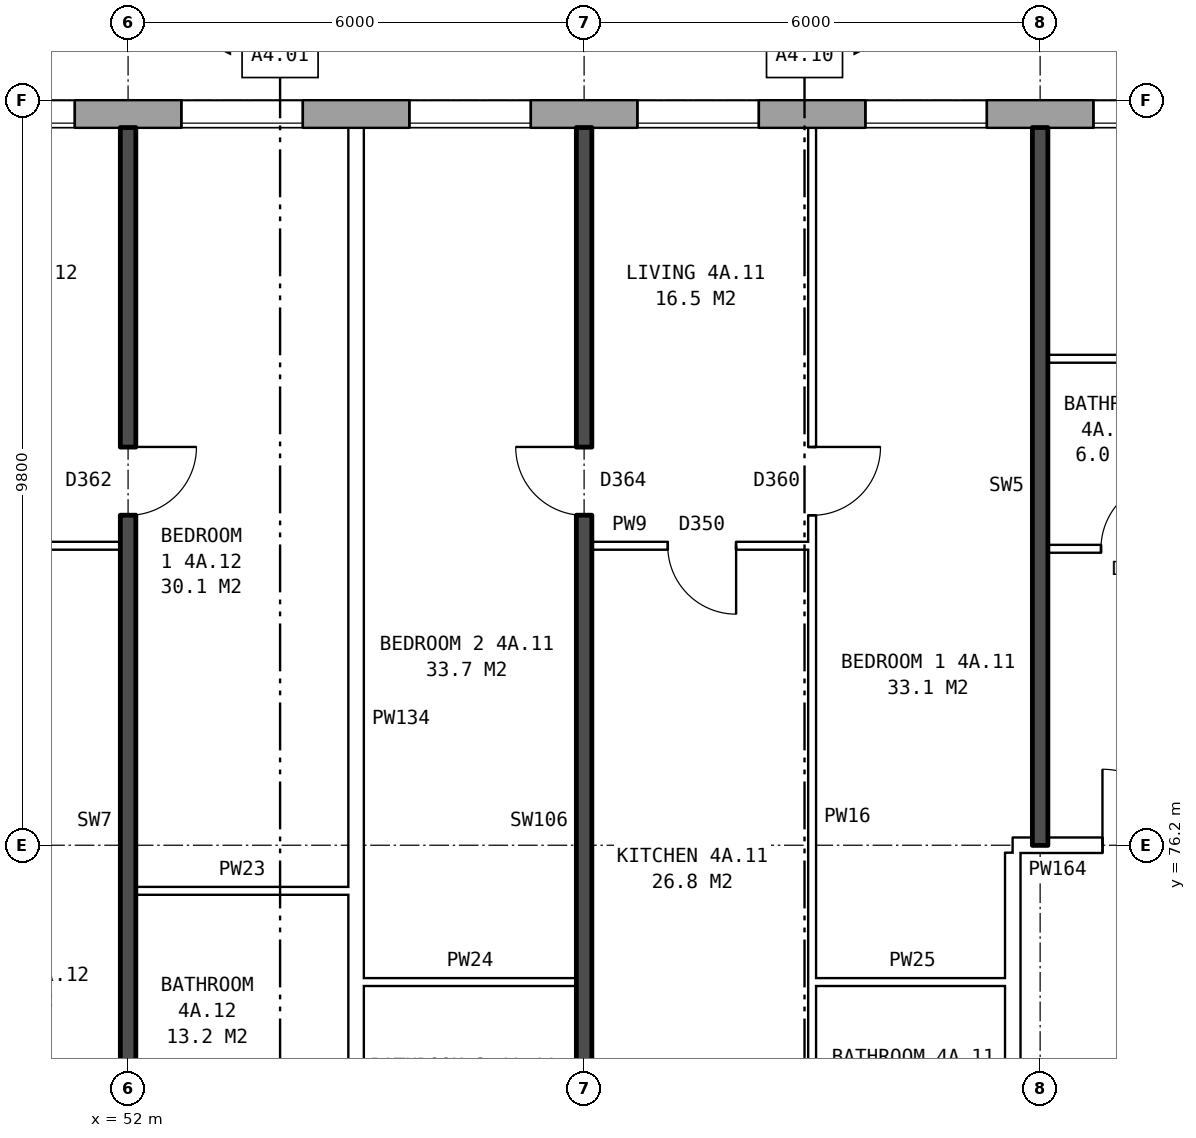
"""IFC4 building model, lengths in metres.
Left out: names, types, materials, properties, quantities, classifications, styles, units other than length and angle.
Written with IfcOpenShell. Run it as: python <this file> out.ifc"""

import sys

from ifc_helpers import new_model, si_unit, direction, frame, frame_2d, origin, place, context, subcontext, project, spatial, rectangle, extrude, element, fill, save


model = new_model("IFC4")
c1 = context("Model", 3, precision=1e-05, world=origin(), true_north=direction((0.0, 1.0)))
c2 = subcontext(c1, "Body", "Model", "MODEL_VIEW")
j1 = project(units=[si_unit("LENGTHUNIT", "METRE"), si_unit("PLANEANGLEUNIT", "RADIAN")], contexts=[c1])
p1 = place(None, origin())
s1 = spatial("IfcSite", under=j1, at=p1, CompositionType="ELEMENT")
p2 = place(p1, origin())
s2 = spatial("IfcBuilding", under=s1, at=p2, CompositionType="ELEMENT")
p3 = place(p2, frame((0.0, 0.0, 19.5)))
s3 = spatial("IfcBuildingStorey", under=s2, at=p3, CompositionType="ELEMENT", Elevation=19.5)
p4 = place(p3, frame((72.925, 85.82, 0.0), z_axis=(0.0, 0.0, 1.0), x_axis=(-1.0, 0.0, 0.0)))
e1 = element("IfcWall", 1, at=p4, inside=s3, PredefinedType="STANDARD", context=c2, shape_type="SweptSolid", body=[
    extrude(rectangle(XDim=50.101, YDim=0.36, at=frame_2d((25.05, 0.0))), origin(), (0.0, 0.0, 1.0), 2.85),
])
p5 = place(p4, frame((0.75, 0.0, 0.8)))
e2 = element("IfcOpeningElement", 2, at=p5, cuts=e1, PredefinedType="OPENING", context=c2, shape_type="SweptSolid", body=[
    extrude(rectangle(XDim=0.6, YDim=0.9, at=frame_2d((0.3, 0.45))), frame((0.0, 0.19, 0.0), z_axis=(0.0, -1.0, 0.0), x_axis=(1.0, 0.0, 0.0)), (0.0, 0.0, 1.0), 0.38),
])
p6 = place(p4, frame((3.625, 0.0, 0.8)))
e3 = element("IfcOpeningElement", 3, at=p6, cuts=e1, PredefinedType="OPENING", context=c2, shape_type="SweptSolid", body=[
    extrude(rectangle(XDim=1.6, YDim=1.8, at=frame_2d((0.8, 0.9))), frame((0.0, 0.19, 0.0), z_axis=(0.0, -1.0, 0.0), x_axis=(1.0, 0.0, 0.0)), (0.0, 0.0, 1.0), 0.38),
])
p7 = place(p4, frame((6.625, 0.0, 0.8)))
e4 = element("IfcOpeningElement", 4, at=p7, cuts=e1, PredefinedType="OPENING", context=c2, shape_type="SweptSolid", body=[
    extrude(rectangle(XDim=1.6, YDim=1.8, at=frame_2d((0.8, 0.9))), frame((0.0, 0.19, 0.0), z_axis=(0.0, -1.0, 0.0), x_axis=(1.0, 0.0, 0.0)), (0.0, 0.0, 1.0), 0.38),
])
p8 = place(p4, frame((9.625, 0.0, 0.8)))
e5 = element("IfcOpeningElement", 5, at=p8, cuts=e1, PredefinedType="OPENING", context=c2, shape_type="SweptSolid", body=[
    extrude(rectangle(XDim=1.6, YDim=1.8, at=frame_2d((0.8, 0.9))), frame((0.0, 0.19, 0.0), z_axis=(0.0, -1.0, 0.0), x_axis=(1.0, 0.0, 0.0)), (0.0, 0.0, 1.0), 0.38),
])
p9 = place(p4, frame((12.625, 0.0, 0.8)))
e6 = element("IfcOpeningElement", 6, at=p9, cuts=e1, PredefinedType="OPENING", context=c2, shape_type="SweptSolid", body=[
    extrude(rectangle(XDim=1.6, YDim=1.8, at=frame_2d((0.8, 0.9))), frame((0.0, 0.19, 0.0), z_axis=(0.0, -1.0, 0.0), x_axis=(1.0, 0.0, 0.0)), (0.0, 0.0, 1.0), 0.38),
])
p10 = place(p4, frame((15.625, 0.0, 0.8)))
e7 = element("IfcOpeningElement", 7, at=p10, cuts=e1, PredefinedType="OPENING", context=c2, shape_type="SweptSolid", body=[
    extrude(rectangle(XDim=1.6, YDim=1.8, at=frame_2d((0.8, 0.9))), frame((0.0, 0.19, 0.0), z_axis=(0.0, -1.0, 0.0), x_axis=(1.0, 0.0, 0.0)), (0.0, 0.0, 1.0), 0.38),
])
p11 = place(p4, frame((18.625, 0.0, 0.8)))
e8 = element("IfcOpeningElement", 8, at=p11, cuts=e1, PredefinedType="OPENING", context=c2, shape_type="SweptSolid", body=[
    extrude(rectangle(XDim=1.6, YDim=1.8, at=frame_2d((0.8, 0.9))), frame((0.0, 0.19, 0.0), z_axis=(0.0, -1.0, 0.0), x_axis=(1.0, 0.0, 0.0)), (0.0, 0.0, 1.0), 0.38),
])
p12 = place(p4, frame((21.625, 0.0, 0.8)))
e9 = element("IfcOpeningElement", 9, at=p12, cuts=e1, PredefinedType="OPENING", context=c2, shape_type="SweptSolid", body=[
    extrude(rectangle(XDim=1.6, YDim=1.8, at=frame_2d((0.8, 0.9))), frame((0.0, 0.19, 0.0), z_axis=(0.0, -1.0, 0.0), x_axis=(1.0, 0.0, 0.0)), (0.0, 0.0, 1.0), 0.38),
])
p13 = place(p4, frame((24.625, 0.0, 0.8)))
e10 = element("IfcOpeningElement", 10, at=p13, cuts=e1, PredefinedType="OPENING", context=c2, shape_type="SweptSolid", body=[
    extrude(rectangle(XDim=1.6, YDim=1.8, at=frame_2d((0.8, 0.9))), frame((0.0, 0.19, 0.0), z_axis=(0.0, -1.0, 0.0), x_axis=(1.0, 0.0, 0.0)), (0.0, 0.0, 1.0), 0.38),
])
p14 = place(p4, frame((27.625, 0.0, 0.8)))
e11 = element("IfcOpeningElement", 11, at=p14, cuts=e1, PredefinedType="OPENING", context=c2, shape_type="SweptSolid", body=[
    extrude(rectangle(XDim=1.6, YDim=1.8, at=frame_2d((0.8, 0.9))), frame((0.0, 0.19, 0.0), z_axis=(0.0, -1.0, 0.0), x_axis=(1.0, 0.0, 0.0)), (0.0, 0.0, 1.0), 0.38),
])
p15 = place(p4, frame((30.625, 0.0, 0.8)))
e12 = element("IfcOpeningElement", 12, at=p15, cuts=e1, PredefinedType="OPENING", context=c2, shape_type="SweptSolid", body=[
    extrude(rectangle(XDim=1.6, YDim=1.8, at=frame_2d((0.8, 0.9))), frame((0.0, 0.19, 0.0), z_axis=(0.0, -1.0, 0.0), x_axis=(1.0, 0.0, 0.0)), (0.0, 0.0, 1.0), 0.38),
])
p16 = place(p4, frame((33.625, 0.0, 0.8)))
e13 = element("IfcOpeningElement", 13, at=p16, cuts=e1, PredefinedType="OPENING", context=c2, shape_type="SweptSolid", body=[
    extrude(rectangle(XDim=1.6, YDim=1.8, at=frame_2d((0.8, 0.9))), frame((0.0, 0.19, 0.0), z_axis=(0.0, -1.0, 0.0), x_axis=(1.0, 0.0, 0.0)), (0.0, 0.0, 1.0), 0.38),
])
p17 = place(p4, frame((36.625, 0.0, 0.8)))
e14 = element("IfcOpeningElement", 14, at=p17, cuts=e1, PredefinedType="OPENING", context=c2, shape_type="SweptSolid", body=[
    extrude(rectangle(XDim=1.6, YDim=1.8, at=frame_2d((0.8, 0.9))), frame((0.0, 0.19, 0.0), z_axis=(0.0, -1.0, 0.0), x_axis=(1.0, 0.0, 0.0)), (0.0, 0.0, 1.0), 0.38),
])
p18 = place(p4, frame((39.625, 0.0, 0.8)))
e15 = element("IfcOpeningElement", 15, at=p18, cuts=e1, PredefinedType="OPENING", context=c2, shape_type="SweptSolid", body=[
    extrude(rectangle(XDim=1.6, YDim=1.8, at=frame_2d((0.8, 0.9))), frame((0.0, 0.19, 0.0), z_axis=(0.0, -1.0, 0.0), x_axis=(1.0, 0.0, 0.0)), (0.0, 0.0, 1.0), 0.38),
])
p19 = place(p4, frame((42.625, 0.0, 0.8)))
e16 = element("IfcOpeningElement", 16, at=p19, cuts=e1, PredefinedType="OPENING", context=c2, shape_type="SweptSolid", body=[
    extrude(rectangle(XDim=1.6, YDim=1.8, at=frame_2d((0.8, 0.9))), frame((0.0, 0.19, 0.0), z_axis=(0.0, -1.0, 0.0), x_axis=(1.0, 0.0, 0.0)), (0.0, 0.0, 1.0), 0.38),
])
p20 = place(p4, frame((45.625, 0.0, 0.8)))
e17 = element("IfcOpeningElement", 17, at=p20, cuts=e1, PredefinedType="OPENING", context=c2, shape_type="SweptSolid", body=[
    extrude(rectangle(XDim=1.6, YDim=1.8, at=frame_2d((0.8, 0.9))), frame((0.0, 0.19, 0.0), z_axis=(0.0, -1.0, 0.0), x_axis=(1.0, 0.0, 0.0)), (0.0, 0.0, 1.0), 0.38),
])
p21 = place(p4, frame((1.65, 0.0, 0.8)))
e18 = element("IfcOpeningElement", 18, at=p21, cuts=e1, PredefinedType="OPENING", context=c2, shape_type="SweptSolid", body=[
    extrude(rectangle(XDim=1.0, YDim=1.5, at=frame_2d((0.5, 0.75))), frame((0.0, 0.19, 0.0), z_axis=(0.0, -1.0, 0.0), x_axis=(1.0, 0.0, 0.0)), (0.0, 0.0, 1.0), 0.38),
])
p22 = place(p3, frame((63.64, 63.9, 0.0), z_axis=(0.0, 0.0, 1.0), x_axis=(0.0, 1.0, 0.0)))
e19 = element("IfcWall", 19, at=p22, inside=s3, PredefinedType="PARTITIONING", context=c2, shape_type="SweptSolid", body=[
    extrude(rectangle(XDim=12.2, YDim=0.2, at=frame_2d((6.1, 0.0))), origin(), (0.0, 0.0, 1.0), 2.85),
])
p23 = place(p22, frame((5.1, 0.0, 0.0)))
e20 = element("IfcOpeningElement", 20, at=p23, cuts=e19, PredefinedType="OPENING", context=c2, shape_type="SweptSolid", body=[
    extrude(rectangle(XDim=2.0, YDim=2.1, at=frame_2d((1.0, 1.05))), frame((0.0, 0.11, 0.0), z_axis=(0.0, -1.0, 0.0), x_axis=(1.0, 0.0, 0.0)), (0.0, 0.0, 1.0), 0.22),
])
p24 = place(p3, frame((55.1, 74.4, 0.0), z_axis=(0.0, 0.0, 1.0), x_axis=(1.0, 0.0, 0.0)))
e21 = element("IfcWall", 21, at=p24, inside=s3, PredefinedType="PARTITIONING", context=c2, shape_type="SweptSolid", body=[
    extrude(rectangle(XDim=2.8, YDim=0.1, at=frame_2d((1.4, 0.0))), origin(), (0.0, 0.0, 1.0), 2.85),
])
p25 = place(p3, frame((61.0, 74.4, 0.0), z_axis=(0.0, 0.0, 1.0), x_axis=(1.0, 0.0, 0.0)))
e22 = element("IfcWall", 22, at=p25, inside=s3, PredefinedType="PARTITIONING", context=c2, shape_type="SweptSolid", body=[
    extrude(rectangle(XDim=2.64, YDim=0.1, at=frame_2d((1.32, 0.0))), origin(), (0.0, 0.0, 1.0), 2.85),
])
p26 = place(p3, frame((52.1, 75.6, 0.0), z_axis=(0.0, 0.0, 1.0), x_axis=(1.0, 0.0, 0.0)))
e23 = element("IfcWall", 23, at=p26, inside=s3, PredefinedType="PARTITIONING", context=c2, shape_type="SweptSolid", body=[
    extrude(rectangle(XDim=2.8, YDim=0.1, at=frame_2d((1.4, 0.0))), origin(), (0.0, 0.0, 1.0), 2.85),
])
p27 = place(p3, frame((63.64, 76.2, 0.0), z_axis=(0.0, 0.0, 1.0), x_axis=(1.0, 0.0, 0.0)))
e24 = element("IfcWall", 24, at=p27, inside=s3, PredefinedType="PARTITIONING", context=c2, shape_type="SweptSolid", body=[
    extrude(rectangle(XDim=3.0, YDim=0.2, at=frame_2d((1.5, 0.0))), origin(), (0.0, 0.0, 1.0), 2.85),
])
p28 = place(p27, frame((1.18, 0.0, 0.0)))
e25 = element("IfcOpeningElement", 25, at=p28, cuts=e24, PredefinedType="OPENING", context=c2, shape_type="SweptSolid", body=[
    extrude(rectangle(XDim=1.0, YDim=2.1, at=frame_2d((0.5, 1.05))), frame((0.0, 0.11, 0.0), z_axis=(0.0, -1.0, 0.0), x_axis=(1.0, 0.0, 0.0)), (0.0, 0.0, 1.0), 0.22),
])
p29 = place(p3, frame((64.1, 80.1, 0.0), z_axis=(0.0, 0.0, 1.0), x_axis=(1.0, 0.0, 0.0)))
e26 = element("IfcWall", 26, at=p29, inside=s3, PredefinedType="PARTITIONING", context=c2, shape_type="SweptSolid", body=[
    extrude(rectangle(XDim=5.8, YDim=0.1, at=frame_2d((2.9, 0.0))), origin(), (0.0, 0.0, 1.0), 2.85),
])
p30 = place(p29, frame((3.6, 0.0, 0.0)))
e27 = element("IfcOpeningElement", 27, at=p30, cuts=e26, PredefinedType="OPENING", context=c2, shape_type="SweptSolid", body=[
    extrude(rectangle(XDim=0.9, YDim=2.1, at=frame_2d((0.45, 1.05))), frame((0.0, 0.06, 0.0), z_axis=(0.0, -1.0, 0.0), x_axis=(1.0, 0.0, 0.0)), (0.0, 0.0, 1.0), 0.12),
])
p31 = place(p29, frame((0.7, 0.0, 0.0)))
e28 = element("IfcOpeningElement", 28, at=p31, cuts=e26, PredefinedType="OPENING", context=c2, shape_type="SweptSolid", body=[
    extrude(rectangle(XDim=0.9, YDim=2.1, at=frame_2d((0.45, 1.05))), frame((0.0, 0.06, 0.0), z_axis=(0.0, -1.0, 0.0), x_axis=(1.0, 0.0, 0.0)), (0.0, 0.0, 1.0), 0.12),
])
p32 = place(p3, frame((49.0, 80.14, 0.0), z_axis=(0.0, 0.0, 1.0), x_axis=(1.0, 0.0, 0.0)))
e29 = element("IfcWall", 29, at=p32, inside=s3, PredefinedType="PARTITIONING", context=c2, shape_type="SweptSolid", body=[
    extrude(rectangle(XDim=2.9, YDim=0.1, at=frame_2d((1.45, 0.0))), origin(), (0.0, 0.0, 1.0), 2.85),
])
p33 = place(p32, frame((1.0, 0.0, 0.0)))
e30 = element("IfcOpeningElement", 30, at=p33, cuts=e29, PredefinedType="OPENING", context=c2, shape_type="SweptSolid", body=[
    extrude(rectangle(XDim=0.9, YDim=2.1, at=frame_2d((0.45, 1.05))), frame((0.0, 0.06, 0.0), z_axis=(0.0, -1.0, 0.0), x_axis=(1.0, 0.0, 0.0)), (0.0, 0.0, 1.0), 0.12),
])
p34 = place(p3, frame((58.1, 80.14, 0.0), z_axis=(0.0, 0.0, 1.0), x_axis=(1.0, 0.0, 0.0)))
e31 = element("IfcWall", 31, at=p34, inside=s3, PredefinedType="PARTITIONING", context=c2, shape_type="SweptSolid", body=[
    extrude(rectangle(XDim=2.9, YDim=0.1, at=frame_2d((1.45, 0.0))), origin(), (0.0, 0.0, 1.0), 2.85),
])
p35 = place(p34, frame((1.0, 0.0, 0.0)))
e32 = element("IfcOpeningElement", 32, at=p35, cuts=e31, PredefinedType="OPENING", context=c2, shape_type="SweptSolid", body=[
    extrude(rectangle(XDim=0.9, YDim=2.1, at=frame_2d((0.45, 1.05))), frame((0.0, 0.06, 0.0), z_axis=(0.0, -1.0, 0.0), x_axis=(1.0, 0.0, 0.0)), (0.0, 0.0, 1.0), 0.12),
])
p36 = place(p3, frame((64.1, 82.6, 0.0), z_axis=(0.0, 0.0, 1.0), x_axis=(1.0, 0.0, 0.0)))
e33 = element("IfcWall", 33, at=p36, inside=s3, PredefinedType="PARTITIONING", context=c2, shape_type="SweptSolid", body=[
    extrude(rectangle(XDim=2.3, YDim=0.1, at=frame_2d((1.15, 0.0))), origin(), (0.0, 0.0, 1.0), 2.85),
])
p37 = place(p3, frame((52.0, 71.2, 0.0), z_axis=(0.0, 0.0, 1.0), x_axis=(0.0, 1.0, 0.0)))
e34 = element("IfcWall", 34, at=p37, inside=s3, PredefinedType="SOLIDWALL", context=c2, shape_type="SweptSolid", body=[
    extrude(rectangle(XDim=14.44, YDim=0.2, at=frame_2d((7.22, 0.0))), origin(), (0.0, 0.0, 1.0), 2.85),
])
p38 = place(p37, frame((9.34, 0.0, 0.0)))
e35 = element("IfcOpeningElement", 35, at=p38, cuts=e34, PredefinedType="OPENING", context=c2, shape_type="SweptSolid", body=[
    extrude(rectangle(XDim=0.9, YDim=2.1, at=frame_2d((0.45, 1.05))), frame((0.0, 0.11, 0.0), z_axis=(0.0, -1.0, 0.0), x_axis=(1.0, 0.0, 0.0)), (0.0, 0.0, 1.0), 0.22),
])
p39 = place(p37, frame((0.4, 0.0, 0.0)))
e36 = element("IfcOpeningElement", 36, at=p39, cuts=e34, PredefinedType="OPENING", context=c2, shape_type="SweptSolid", body=[
    extrude(rectangle(XDim=0.9, YDim=2.1, at=frame_2d((0.45, 1.05))), frame((0.0, 0.11, 0.0), z_axis=(0.0, -1.0, 0.0), x_axis=(1.0, 0.0, 0.0)), (0.0, 0.0, 1.0), 0.22),
])
p40 = place(p3, frame((55.0, 71.3, 0.0), z_axis=(0.0, 0.0, 1.0), x_axis=(0.0, 1.0, 0.0)))
e37 = element("IfcWall", 37, at=p40, inside=s3, PredefinedType="PARTITIONING", context=c2, shape_type="SweptSolid", body=[
    extrude(rectangle(XDim=14.34, YDim=0.2, at=frame_2d((7.17, 0.0))), origin(), (0.0, 0.0, 1.0), 2.85),
])
p41 = place(p3, frame((58.0, 71.2, 0.0), z_axis=(0.0, 0.0, 1.0), x_axis=(0.0, 1.0, 0.0)))
e38 = element("IfcWall", 38, at=p41, inside=s3, PredefinedType="SOLIDWALL", context=c2, shape_type="SweptSolid", body=[
    extrude(rectangle(XDim=14.44, YDim=0.2, at=frame_2d((7.22, 0.0))), origin(), (0.0, 0.0, 1.0), 2.85),
])
p42 = place(p41, frame((9.34, 0.0, 0.0)))
e39 = element("IfcOpeningElement", 39, at=p42, cuts=e38, PredefinedType="OPENING", context=c2, shape_type="SweptSolid", body=[
    extrude(rectangle(XDim=0.9, YDim=2.1, at=frame_2d((0.45, 1.05))), frame((0.0, 0.11, 0.0), z_axis=(0.0, -1.0, 0.0), x_axis=(1.0, 0.0, 0.0)), (0.0, 0.0, 1.0), 0.22),
])
p43 = place(p41, frame((0.4, 0.0, 0.0)))
e40 = element("IfcOpeningElement", 40, at=p43, cuts=e38, PredefinedType="OPENING", context=c2, shape_type="SweptSolid", body=[
    extrude(rectangle(XDim=0.9, YDim=2.1, at=frame_2d((0.45, 1.05))), frame((0.0, 0.11, 0.0), z_axis=(0.0, -1.0, 0.0), x_axis=(1.0, 0.0, 0.0)), (0.0, 0.0, 1.0), 0.22),
])
p44 = place(p3, frame((61.0, 71.3, 0.0), z_axis=(0.0, 0.0, 1.0), x_axis=(0.0, 1.0, 0.0)))
e41 = element("IfcWall", 41, at=p44, inside=s3, PredefinedType="PARTITIONING", context=c2, shape_type="SweptSolid", body=[
    extrude(rectangle(XDim=14.34, YDim=0.1, at=frame_2d((7.17, 0.0))), origin(), (0.0, 0.0, 1.0), 2.85),
])
p45 = place(p44, frame((9.24, 0.0, 0.0)))
e42 = element("IfcOpeningElement", 42, at=p45, cuts=e41, PredefinedType="OPENING", context=c2, shape_type="SweptSolid", body=[
    extrude(rectangle(XDim=0.9, YDim=2.1, at=frame_2d((0.45, 1.05))), frame((0.0, 0.06, 0.0), z_axis=(0.0, -1.0, 0.0), x_axis=(1.0, 0.0, 0.0)), (0.0, 0.0, 1.0), 0.12),
])
p46 = place(p44, frame((0.4, 0.0, 0.0)))
e43 = element("IfcOpeningElement", 43, at=p46, cuts=e41, PredefinedType="OPENING", context=c2, shape_type="SweptSolid", body=[
    extrude(rectangle(XDim=0.9, YDim=2.1, at=frame_2d((0.45, 1.05))), frame((0.0, 0.06, 0.0), z_axis=(0.0, -1.0, 0.0), x_axis=(1.0, 0.0, 0.0)), (0.0, 0.0, 1.0), 0.12),
])
p47 = place(p3, frame((64.0, 76.2, 0.0), z_axis=(0.0, 0.0, 1.0), x_axis=(0.0, 1.0, 0.0)))
e44 = element("IfcWall", 44, at=p47, inside=s3, PredefinedType="SOLIDWALL", context=c2, shape_type="SweptSolid", body=[
    extrude(rectangle(XDim=9.44, YDim=0.2, at=frame_2d((4.72, 0.0))), origin(), (0.0, 0.0, 1.0), 2.85),
])
p48 = place(p7, origin())
e45 = element("IfcWindow", 45, at=p48, inside=s3, PartitioningType="SINGLE_PANEL", PredefinedType="WINDOW", context=c2, shape_type="SweptSolid", body=[
    extrude(rectangle(XDim=1.6, YDim=1.8, at=frame_2d((0.8, 0.9))), frame((0.0, 0.15, 0.0), z_axis=(0.0, -1.0, 0.0), x_axis=(1.0, 0.0, 0.0)), (0.0, 0.0, 1.0), 0.06),
])
fill(e4, e45)
p49 = place(p8, origin())
e46 = element("IfcWindow", 46, at=p49, inside=s3, PartitioningType="SINGLE_PANEL", PredefinedType="WINDOW", context=c2, shape_type="SweptSolid", body=[
    extrude(rectangle(XDim=1.6, YDim=1.8, at=frame_2d((0.8, 0.9))), frame((0.0, 0.15, 0.0), z_axis=(0.0, -1.0, 0.0), x_axis=(1.0, 0.0, 0.0)), (0.0, 0.0, 1.0), 0.06),
])
fill(e5, e46)
p50 = place(p9, origin())
e47 = element("IfcWindow", 47, at=p50, inside=s3, PartitioningType="SINGLE_PANEL", PredefinedType="WINDOW", context=c2, shape_type="SweptSolid", body=[
    extrude(rectangle(XDim=1.6, YDim=1.8, at=frame_2d((0.8, 0.9))), frame((0.0, 0.15, 0.0), z_axis=(0.0, -1.0, 0.0), x_axis=(1.0, 0.0, 0.0)), (0.0, 0.0, 1.0), 0.06),
])
fill(e6, e47)
p51 = place(p10, origin())
e48 = element("IfcWindow", 48, at=p51, inside=s3, PartitioningType="SINGLE_PANEL", PredefinedType="WINDOW", context=c2, shape_type="SweptSolid", body=[
    extrude(rectangle(XDim=1.6, YDim=1.8, at=frame_2d((0.8, 0.9))), frame((0.0, 0.15, 0.0), z_axis=(0.0, -1.0, 0.0), x_axis=(1.0, 0.0, 0.0)), (0.0, 0.0, 1.0), 0.06),
])
fill(e7, e48)
p52 = place(p11, origin())
e49 = element("IfcWindow", 49, at=p52, inside=s3, PartitioningType="SINGLE_PANEL", PredefinedType="WINDOW", context=c2, shape_type="SweptSolid", body=[
    extrude(rectangle(XDim=1.6, YDim=1.8, at=frame_2d((0.8, 0.9))), frame((0.0, 0.15, 0.0), z_axis=(0.0, -1.0, 0.0), x_axis=(1.0, 0.0, 0.0)), (0.0, 0.0, 1.0), 0.06),
])
fill(e8, e49)
p53 = place(p12, origin())
e50 = element("IfcWindow", 50, at=p53, inside=s3, PartitioningType="SINGLE_PANEL", PredefinedType="WINDOW", context=c2, shape_type="SweptSolid", body=[
    extrude(rectangle(XDim=1.6, YDim=1.8, at=frame_2d((0.8, 0.9))), frame((0.0, 0.15, 0.0), z_axis=(0.0, -1.0, 0.0), x_axis=(1.0, 0.0, 0.0)), (0.0, 0.0, 1.0), 0.06),
])
fill(e9, e50)
p54 = place(p28, origin())
e51 = element("IfcDoor", 51, at=p54, inside=s3, OperationType="SINGLE_SWING_LEFT", PredefinedType="DOOR", context=c2, shape_type="SweptSolid", body=[
    extrude(rectangle(XDim=1.0, YDim=2.1, at=frame_2d((0.5, 1.05))), frame((0.0, 0.025, 0.0), z_axis=(0.0, -1.0, 0.0), x_axis=(1.0, 0.0, 0.0)), (0.0, 0.0, 1.0), 0.05),
])
fill(e25, e51)
p55 = place(p31, origin())
e52 = element("IfcDoor", 52, at=p55, inside=s3, OperationType="SINGLE_SWING_RIGHT", PredefinedType="DOOR", context=c2, shape_type="SweptSolid", body=[
    extrude(rectangle(XDim=0.9, YDim=2.1, at=frame_2d((0.45, 1.05))), frame((0.0, 0.025, 0.0), z_axis=(0.0, -1.0, 0.0), x_axis=(1.0, 0.0, 0.0)), (0.0, 0.0, 1.0), 0.05),
])
fill(e28, e52)
p56 = place(p45, frame((0.9, 0.0, 0.0), z_axis=(0.0, 0.0, 1.0), x_axis=(-1.0, 0.0, 0.0)))
e53 = element("IfcDoor", 53, at=p56, inside=s3, OperationType="SINGLE_SWING_LEFT", PredefinedType="DOOR", context=c2, shape_type="SweptSolid", body=[
    extrude(rectangle(XDim=0.9, YDim=2.1, at=frame_2d((0.45, 1.05))), frame((0.0, 0.025, 0.0), z_axis=(0.0, -1.0, 0.0), x_axis=(1.0, 0.0, 0.0)), (0.0, 0.0, 1.0), 0.05),
])
fill(e42, e53)
p57 = place(p42, origin())
e54 = element("IfcDoor", 54, at=p57, inside=s3, OperationType="SINGLE_SWING_RIGHT", PredefinedType="DOOR", context=c2, shape_type="SweptSolid", body=[
    extrude(rectangle(XDim=0.9, YDim=2.1, at=frame_2d((0.45, 1.05))), frame((0.0, 0.025, 0.0), z_axis=(0.0, -1.0, 0.0), x_axis=(1.0, 0.0, 0.0)), (0.0, 0.0, 1.0), 0.05),
])
fill(e39, e54)
p58 = place(p35, frame((0.9, 0.0, 0.0), z_axis=(0.0, 0.0, 1.0), x_axis=(-1.0, 0.0, 0.0)))
e55 = element("IfcDoor", 55, at=p58, inside=s3, OperationType="SINGLE_SWING_LEFT", PredefinedType="DOOR", context=c2, shape_type="SweptSolid", body=[
    extrude(rectangle(XDim=0.9, YDim=2.1, at=frame_2d((0.45, 1.05))), frame((0.0, 0.025, 0.0), z_axis=(0.0, -1.0, 0.0), x_axis=(1.0, 0.0, 0.0)), (0.0, 0.0, 1.0), 0.05),
])
fill(e32, e55)
p59 = place(p38, frame((0.9, 0.0, 0.0), z_axis=(0.0, 0.0, 1.0), x_axis=(-1.0, 0.0, 0.0)))
e56 = element("IfcDoor", 56, at=p59, inside=s3, OperationType="SINGLE_SWING_LEFT", PredefinedType="DOOR", context=c2, shape_type="SweptSolid", body=[
    extrude(rectangle(XDim=0.9, YDim=2.1, at=frame_2d((0.45, 1.05))), frame((0.0, 0.025, 0.0), z_axis=(0.0, -1.0, 0.0), x_axis=(1.0, 0.0, 0.0)), (0.0, 0.0, 1.0), 0.05),
])
fill(e35, e56)
save(model, sys.argv[1])
